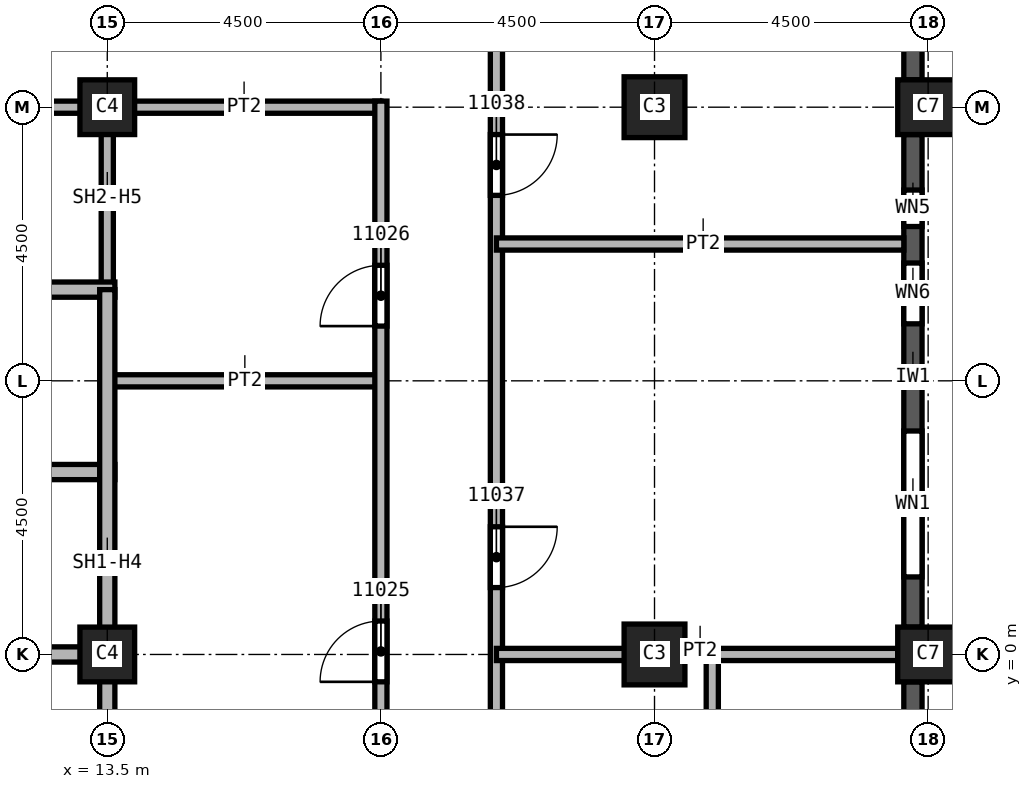
"""IFC4 building model, lengths in metres.
Left out: names, types, materials, properties, quantities, classifications, styles, units other than length and angle.
Written with IfcOpenShell. Run it as: python <this file> out.ifc"""

import sys

from ifc_helpers import new_model, si_unit, direction, frame, frame_2d, origin, origin_2d, place, context, subcontext, project, spatial, rectangle, extrude, element, fill, save


model = new_model("IFC4")
c1 = context("Model", 3, precision=1e-05, world=origin(), true_north=direction((0.0, 1.0)))
c2 = subcontext(c1, "Body", "Model", "MODEL_VIEW")
j1 = project(units=[si_unit("LENGTHUNIT", "METRE"), si_unit("PLANEANGLEUNIT", "RADIAN")], contexts=[c1])
p1 = place(None, origin())
s1 = spatial("IfcSite", under=j1, at=p1, CompositionType="ELEMENT")
p2 = place(p1, origin())
s2 = spatial("IfcBuilding", under=s1, at=p2, CompositionType="ELEMENT")
p3 = place(p2, frame((0.0, 0.0, 188.0)))
s3 = spatial("IfcBuildingStorey", under=s2, at=p3, CompositionType="ELEMENT", Elevation=188.0)
for number, where, z_axis, x_axis in (
    (1, (22.5, 0.0, 0.0), (0.0, 0.0, 1.0), (1.0, 0.0, 0.0)),
    (2, (22.5, 9.0, 0.0), (0.0, 0.0, 1.0), (1.0, 0.0, 0.0)),
):
    element("IfcColumn", number, at=place(p3, frame(where, z_axis=z_axis, x_axis=x_axis)), inside=s3, PredefinedType="COLUMN", context=c2, shape_type="SweptSolid", body=[
        extrude(rectangle(XDim=1.0, YDim=1.0, at=origin_2d()), origin(), (0.0, 0.0, 1.0), 3.72),
    ])
for number, where, z_axis, x_axis in (
    (3, (13.5, 0.0, 0.0), (0.0, 0.0, 1.0), (1.0, 0.0, 0.0)),
    (4, (13.5, 9.0, 0.0), (0.0, 0.0, 1.0), (1.0, 0.0, 0.0)),
):
    element("IfcColumn", number, at=place(p3, frame(where, z_axis=z_axis, x_axis=x_axis)), inside=s3, PredefinedType="COLUMN", context=c2, shape_type="SweptSolid", body=[
        extrude(rectangle(XDim=0.9, YDim=0.9, at=origin_2d()), origin(), (0.0, 0.0, 1.0), 3.72),
    ])
for number, where, z_axis, x_axis in (
    (5, (27.0, 0.0, 0.0), (0.0, 0.0, 1.0), (0.0, 1.0, 0.0)),
    (6, (27.0, 9.0, 0.0), (0.0, 0.0, 1.0), (0.0, 1.0, 0.0)),
):
    element("IfcColumn", number, at=place(p3, frame(where, z_axis=z_axis, x_axis=x_axis)), inside=s3, PredefinedType="COLUMN", context=c2, shape_type="SweptSolid", body=[
        extrude(rectangle(XDim=0.9, YDim=1.0, at=origin_2d()), origin(), (0.0, 0.0, 1.0), 3.72),
    ])
p4 = place(p3, frame((26.75, -8.55, 0.0), z_axis=(0.0, 0.0, 1.0), x_axis=(0.0, 1.0, 0.0)))
e7 = element("IfcWall", 7, at=p4, inside=s3, PredefinedType="SOLIDWALL", context=c2, shape_type="SweptSolid", body=[
    extrude(rectangle(XDim=8.1, YDim=0.3, at=frame_2d((4.05, 0.0))), origin(), (0.0, 0.0, 1.0), 3.12),
])
p5 = place(p4, frame((0.825, 0.0, 0.8)))
e8 = element("IfcOpeningElement", 8, at=p5, cuts=e7, PredefinedType="OPENING", context=c2, shape_type="SweptSolid", body=[
    extrude(rectangle(XDim=2.4, YDim=1.95, at=frame_2d((1.2, 0.975))), frame((0.0, 0.15, 0.0), z_axis=(0.0, -1.0, 0.0), x_axis=(1.0, 0.0, 0.0)), (0.0, 0.0, 1.0), 0.3),
])
p6 = place(p4, frame((4.875, 0.0, 0.8)))
e9 = element("IfcOpeningElement", 9, at=p6, cuts=e7, PredefinedType="OPENING", context=c2, shape_type="SweptSolid", body=[
    extrude(rectangle(XDim=2.4, YDim=1.95, at=frame_2d((1.2, 0.975))), frame((0.0, 0.15, 0.0), z_axis=(0.0, -1.0, 0.0), x_axis=(1.0, 0.0, 0.0)), (0.0, 0.0, 1.0), 0.3),
])
p7 = place(p3, frame((26.75, 0.45, 0.0), z_axis=(0.0, 0.0, 1.0), x_axis=(0.0, 1.0, 0.0)))
e10 = element("IfcWall", 10, at=p7, inside=s3, PredefinedType="SOLIDWALL", context=c2, shape_type="SweptSolid", body=[
    extrude(rectangle(XDim=8.1, YDim=0.3, at=frame_2d((4.05, 0.0))), origin(), (0.0, 0.0, 1.0), 3.12),
])
p8 = place(p7, frame((0.825, 0.0, 0.8)))
e11 = element("IfcOpeningElement", 11, at=p8, cuts=e10, PredefinedType="OPENING", context=c2, shape_type="SweptSolid", body=[
    extrude(rectangle(XDim=2.4, YDim=1.95, at=frame_2d((1.2, 0.975))), frame((0.0, 0.15, 0.0), z_axis=(0.0, -1.0, 0.0), x_axis=(1.0, 0.0, 0.0)), (0.0, 0.0, 1.0), 0.3),
])
p9 = place(p7, frame((4.988, 0.0, 0.8)))
e12 = element("IfcOpeningElement", 12, at=p9, cuts=e10, PredefinedType="OPENING", context=c2, shape_type="SweptSolid", body=[
    extrude(rectangle(XDim=1.0, YDim=1.95, at=frame_2d((0.5, 0.975))), frame((0.0, 0.15, 0.0), z_axis=(0.0, -1.0, 0.0), x_axis=(1.0, 0.0, 0.0)), (0.0, 0.0, 1.0), 0.3),
])
p10 = place(p7, frame((6.587, 0.0, 0.8)))
e13 = element("IfcOpeningElement", 13, at=p10, cuts=e10, PredefinedType="OPENING", context=c2, shape_type="SweptSolid", body=[
    extrude(rectangle(XDim=0.6, YDim=1.95, at=frame_2d((0.3, 0.975))), frame((0.0, 0.15, 0.0), z_axis=(0.0, -1.0, 0.0), x_axis=(1.0, 0.0, 0.0)), (0.0, 0.0, 1.0), 0.3),
])
p11 = place(p3, frame((26.75, 9.45, 0.0), z_axis=(0.0, 0.0, 1.0), x_axis=(0.0, 1.0, 0.0)))
e14 = element("IfcWall", 14, at=p11, inside=s3, PredefinedType="SOLIDWALL", context=c2, shape_type="SweptSolid", body=[
    extrude(rectangle(XDim=8.1, YDim=0.3, at=frame_2d((4.05, 0.0))), origin(), (0.0, 0.0, 1.0), 3.12),
])
p12 = place(p11, frame((4.875, 0.0, 0.8)))
e15 = element("IfcOpeningElement", 15, at=p12, cuts=e14, PredefinedType="OPENING", context=c2, shape_type="SweptSolid", body=[
    extrude(rectangle(XDim=2.4, YDim=1.95, at=frame_2d((1.2, 0.975))), frame((0.0, 0.15, 0.0), z_axis=(0.0, -1.0, 0.0), x_axis=(1.0, 0.0, 0.0)), (0.0, 0.0, 1.0), 0.3),
])
p13 = place(p11, frame((0.913, 0.0, 0.8)))
e16 = element("IfcOpeningElement", 16, at=p13, cuts=e14, PredefinedType="OPENING", context=c2, shape_type="SweptSolid", body=[
    extrude(rectangle(XDim=0.6, YDim=1.95, at=frame_2d((0.3, 0.975))), frame((0.0, 0.15, 0.0), z_axis=(0.0, -1.0, 0.0), x_axis=(1.0, 0.0, 0.0)), (0.0, 0.0, 1.0), 0.3),
])
p14 = place(p11, frame((2.113, 0.0, 0.8)))
e17 = element("IfcOpeningElement", 17, at=p14, cuts=e14, PredefinedType="OPENING", context=c2, shape_type="SweptSolid", body=[
    extrude(rectangle(XDim=1.0, YDim=1.95, at=frame_2d((0.5, 0.975))), frame((0.0, 0.15, 0.0), z_axis=(0.0, -1.0, 0.0), x_axis=(1.0, 0.0, 0.0)), (0.0, 0.0, 1.0), 0.3),
])
for number, where, z_axis, x_axis in (
    (18, (13.5, 4.5, 0.0), (0.0, 0.0, 1.0), (1.0, 0.0, 0.0)),
    (19, (18.0, 9.0, 0.0), (0.0, 0.0, 1.0), (-1.0, 0.0, 0.0)),
):
    element("IfcWall", number, at=place(p3, frame(where, z_axis=z_axis, x_axis=x_axis)), inside=s3, PredefinedType="PARTITIONING", context=c2, shape_type="SweptSolid", body=[
        extrude(rectangle(XDim=4.5, YDim=0.2, at=frame_2d((2.25, 0.0))), origin(), (0.0, 0.0, 1.0), 3.72),
    ])
p15 = place(p3, frame((18.0, -9.1, 0.0), z_axis=(0.0, 0.0, 1.0), x_axis=(0.0, 1.0, 0.0)))
e20 = element("IfcWall", 20, at=p15, inside=s3, PredefinedType="PARTITIONING", context=c2, shape_type="SweptSolid", body=[
    extrude(rectangle(XDim=18.2, YDim=0.2, at=frame_2d((9.1, 0.0))), origin(), (0.0, 0.0, 1.0), 3.72),
])
p16 = place(p15, frame((2.8, 0.0, 0.0)))
e21 = element("IfcOpeningElement", 21, at=p16, cuts=e20, PredefinedType="OPENING", context=c2, shape_type="SweptSolid", body=[
    extrude(rectangle(XDim=1.0, YDim=2.1, at=frame_2d((0.5, 1.05))), frame((0.0, 0.1, 0.0), z_axis=(0.0, -1.0, 0.0), x_axis=(1.0, 0.0, 0.0)), (0.0, 0.0, 1.0), 0.2),
])
p17 = place(p15, frame((8.65, 0.0, 0.0)))
e22 = element("IfcOpeningElement", 22, at=p17, cuts=e20, PredefinedType="OPENING", context=c2, shape_type="SweptSolid", body=[
    extrude(rectangle(XDim=1.0, YDim=2.1, at=frame_2d((0.5, 1.05))), frame((0.0, 0.1, 0.0), z_axis=(0.0, -1.0, 0.0), x_axis=(1.0, 0.0, 0.0)), (0.0, 0.0, 1.0), 0.2),
])
p18 = place(p15, frame((14.5, 0.0, 0.0)))
e23 = element("IfcOpeningElement", 23, at=p18, cuts=e20, PredefinedType="OPENING", context=c2, shape_type="SweptSolid", body=[
    extrude(rectangle(XDim=1.0, YDim=2.1, at=frame_2d((0.5, 1.05))), frame((0.0, 0.1, 0.0), z_axis=(0.0, -1.0, 0.0), x_axis=(1.0, 0.0, 0.0)), (0.0, 0.0, 1.0), 0.2),
])
p19 = place(p3, frame((19.9, 22.4, 0.0), z_axis=(0.0, 0.0, 1.0), x_axis=(0.0, -1.0, 0.0)))
e24 = element("IfcWall", 24, at=p19, inside=s3, PredefinedType="PARTITIONING", context=c2, shape_type="SweptSolid", body=[
    extrude(rectangle(XDim=44.8, YDim=0.2, at=frame_2d((22.4, 0.0))), origin(), (0.0, 0.0, 1.0), 3.72),
])
p20 = place(p19, frame((20.3, 0.0, 0.0)))
e25 = element("IfcOpeningElement", 25, at=p20, cuts=e24, PredefinedType="OPENING", context=c2, shape_type="SweptSolid", body=[
    extrude(rectangle(XDim=1.0, YDim=2.1, at=frame_2d((0.5, 1.05))), frame((0.0, 0.1, 0.0), z_axis=(0.0, -1.0, 0.0), x_axis=(1.0, 0.0, 0.0)), (0.0, 0.0, 1.0), 0.2),
])
p21 = place(p19, frame((13.85, 0.0, 0.0)))
e26 = element("IfcOpeningElement", 26, at=p21, cuts=e24, PredefinedType="OPENING", context=c2, shape_type="SweptSolid", body=[
    extrude(rectangle(XDim=1.0, YDim=2.1, at=frame_2d((0.5, 1.05))), frame((0.0, 0.1, 0.0), z_axis=(0.0, -1.0, 0.0), x_axis=(1.0, 0.0, 0.0)), (0.0, 0.0, 1.0), 0.2),
])
p22 = place(p19, frame((5.2, 0.0, 0.0)))
e27 = element("IfcOpeningElement", 27, at=p22, cuts=e24, PredefinedType="OPENING", context=c2, shape_type="SweptSolid", body=[
    extrude(rectangle(XDim=1.0, YDim=2.1, at=frame_2d((0.5, 1.05))), frame((0.0, 0.1, 0.0), z_axis=(0.0, -1.0, 0.0), x_axis=(1.0, 0.0, 0.0)), (0.0, 0.0, 1.0), 0.2),
])
p23 = place(p19, frame((40.05, 0.0, 0.0)))
e28 = element("IfcOpeningElement", 28, at=p23, cuts=e24, PredefinedType="OPENING", context=c2, shape_type="SweptSolid", body=[
    extrude(rectangle(XDim=1.0, YDim=2.1, at=frame_2d((0.5, 1.05))), frame((0.0, 0.1, 0.0), z_axis=(0.0, -1.0, 0.0), x_axis=(1.0, 0.0, 0.0)), (0.0, 0.0, 1.0), 0.2),
])
p24 = place(p19, frame((26.9, 0.0, 0.0)))
e29 = element("IfcOpeningElement", 29, at=p24, cuts=e24, PredefinedType="OPENING", context=c2, shape_type="SweptSolid", body=[
    extrude(rectangle(XDim=1.0, YDim=2.1, at=frame_2d((0.5, 1.05))), frame((0.0, 0.1, 0.0), z_axis=(0.0, -1.0, 0.0), x_axis=(1.0, 0.0, 0.0)), (0.0, 0.0, 1.0), 0.2),
])
p25 = place(p3, frame((19.9, 6.75, 0.0), z_axis=(0.0, 0.0, 1.0), x_axis=(1.0, 0.0, 0.0)))
e30 = element("IfcWall", 30, at=p25, inside=s3, PredefinedType="PARTITIONING", context=c2, shape_type="SweptSolid", body=[
    extrude(rectangle(XDim=6.7, YDim=0.2, at=frame_2d((3.35, 0.0))), origin(), (0.0, 0.0, 1.0), 3.72),
])
p26 = place(p3, frame((23.45, 0.0, 0.0), z_axis=(0.0, 0.0, 1.0), x_axis=(0.0, -1.0, 0.0)))
e31 = element("IfcWall", 31, at=p26, inside=s3, PredefinedType="PARTITIONING", context=c2, shape_type="SweptSolid", body=[
    extrude(rectangle(XDim=13.5, YDim=0.2, at=frame_2d((6.75, 0.0))), origin(), (0.0, 0.0, 1.0), 3.72),
])
p27 = place(p26, frame((3.55, 0.0, 0.0)))
e32 = element("IfcOpeningElement", 32, at=p27, cuts=e31, PredefinedType="OPENING", context=c2, shape_type="SweptSolid", body=[
    extrude(rectangle(XDim=1.0, YDim=2.1, at=frame_2d((0.5, 1.05))), frame((0.0, 0.1, 0.0), z_axis=(0.0, -1.0, 0.0), x_axis=(1.0, 0.0, 0.0)), (0.0, 0.0, 1.0), 0.2),
])
p28 = place(p3, frame((26.5, 0.0, 0.0), z_axis=(0.0, 0.0, 1.0), x_axis=(-1.0, 0.0, 0.0)))
e33 = element("IfcWall", 33, at=p28, inside=s3, PredefinedType="PARTITIONING", context=c2, shape_type="SweptSolid", body=[
    extrude(rectangle(XDim=6.6, YDim=0.2, at=frame_2d((3.3, 0.0))), origin(), (0.0, 0.0, 1.0), 3.72),
])
for number, where, z_axis, x_axis in (
    (34, (10.5, 9.0, 0.0), (0.0, 0.0, 1.0), (1.0, 0.0, 0.0)),
    (35, (13.5, 9.1, 0.0), (0.0, 0.0, 1.0), (0.0, -1.0, 0.0)),
):
    element("IfcWall", number, at=place(p3, frame(where, z_axis=z_axis, x_axis=x_axis)), inside=s3, PredefinedType="SOLIDWALL", context=c2, shape_type="SweptSolid", body=[
        extrude(rectangle(XDim=3.1, YDim=0.2, at=frame_2d((1.55, 0.0))), origin(), (0.0, 0.0, 1.0), 2.958),
    ])
p29 = place(p3, frame((7.5, 3.0, 0.0), z_axis=(0.0, 0.0, 1.0), x_axis=(1.0, 0.0, 0.0)))
e36 = element("IfcWall", 36, at=p29, inside=s3, PredefinedType="SOLIDWALL", context=c2, shape_type="SweptSolid", body=[
    extrude(rectangle(XDim=6.125, YDim=0.25, at=frame_2d((3.062, 0.0))), origin(), (0.0, 0.0, 1.0), 3.72),
])
p30 = place(p29, frame((1.0, 0.0, 0.0)))
e37 = element("IfcOpeningElement", 37, at=p30, cuts=e36, PredefinedType="OPENING", context=c2, shape_type="SweptSolid", body=[
    extrude(rectangle(XDim=1.1, YDim=2.1, at=frame_2d((0.55, 1.05))), frame((0.0, 0.125, 0.0), z_axis=(0.0, -1.0, 0.0), x_axis=(1.0, 0.0, 0.0)), (0.0, 0.0, 1.0), 0.25),
])
for number, where, z_axis, x_axis in (
    (38, (10.5, 0.0, 0.0), (0.0, 0.0, 1.0), (1.0, 0.0, 0.0)),
    (39, (10.5, 6.0, 0.0), (0.0, 0.0, 1.0), (1.0, 0.0, 0.0)),
):
    element("IfcWall", number, at=place(p3, frame(where, z_axis=z_axis, x_axis=x_axis)), inside=s3, PredefinedType="SOLIDWALL", context=c2, shape_type="SweptSolid", body=[
        extrude(rectangle(XDim=3.125, YDim=0.25, at=frame_2d((1.562, 0.0))), origin(), (0.0, 0.0, 1.0), 3.72),
    ])
p31 = place(p3, frame((13.5, 6.0, 0.0), z_axis=(0.0, 0.0, 1.0), x_axis=(0.0, -1.0, 0.0)))
e40 = element("IfcWall", 40, at=p31, inside=s3, PredefinedType="SOLIDWALL", context=c2, shape_type="SweptSolid", body=[
    extrude(rectangle(XDim=9.0, YDim=0.25, at=frame_2d((4.5, 0.0))), origin(), (0.0, 0.0, 1.0), 2.958),
])
p32 = place(p8, origin())
e41 = element("IfcWindow", 41, at=p32, inside=s3, PartitioningType="SINGLE_PANEL", PredefinedType="WINDOW", context=c2, shape_type="SweptSolid", body=[
    extrude(rectangle(XDim=2.4, YDim=1.95, at=frame_2d((1.2, 0.975))), frame((0.0, 0.03, 0.0), z_axis=(0.0, -1.0, 0.0), x_axis=(1.0, 0.0, 0.0)), (0.0, 0.0, 1.0), 0.06),
])
fill(e11, e41)
p33 = place(p17, origin())
e42 = element("IfcDoor", 42, at=p33, inside=s3, OperationType="SINGLE_SWING_RIGHT", PredefinedType="DOOR", context=c2, shape_type="SweptSolid", body=[
    extrude(rectangle(XDim=1.0, YDim=2.1, at=frame_2d((0.5, 1.05))), frame((0.0, 0.025, 0.0), z_axis=(0.0, -1.0, 0.0), x_axis=(1.0, 0.0, 0.0)), (0.0, 0.0, 1.0), 0.05),
])
fill(e22, e42)
p34 = place(p18, origin())
e43 = element("IfcDoor", 43, at=p34, inside=s3, OperationType="SINGLE_SWING_LEFT", PredefinedType="DOOR", context=c2, shape_type="SweptSolid", body=[
    extrude(rectangle(XDim=1.0, YDim=2.1, at=frame_2d((0.5, 1.05))), frame((0.0, 0.025, 0.0), z_axis=(0.0, -1.0, 0.0), x_axis=(1.0, 0.0, 0.0)), (0.0, 0.0, 1.0), 0.05),
])
fill(e23, e43)
p35 = place(p20, origin())
e44 = element("IfcDoor", 44, at=p35, inside=s3, OperationType="SINGLE_SWING_RIGHT", PredefinedType="DOOR", context=c2, shape_type="SweptSolid", body=[
    extrude(rectangle(XDim=1.0, YDim=2.1, at=frame_2d((0.5, 1.05))), frame((0.0, 0.025, 0.0), z_axis=(0.0, -1.0, 0.0), x_axis=(1.0, 0.0, 0.0)), (0.0, 0.0, 1.0), 0.05),
])
fill(e25, e44)
p36 = place(p21, origin())
e45 = element("IfcDoor", 45, at=p36, inside=s3, OperationType="SINGLE_SWING_LEFT", PredefinedType="DOOR", context=c2, shape_type="SweptSolid", body=[
    extrude(rectangle(XDim=1.0, YDim=2.1, at=frame_2d((0.5, 1.05))), frame((0.0, 0.025, 0.0), z_axis=(0.0, -1.0, 0.0), x_axis=(1.0, 0.0, 0.0)), (0.0, 0.0, 1.0), 0.05),
])
fill(e26, e45)
p37 = place(p9, origin())
e46 = element("IfcWindow", 46, at=p37, inside=s3, PartitioningType="SINGLE_PANEL", PredefinedType="WINDOW", context=c2, shape_type="SweptSolid", body=[
    extrude(rectangle(XDim=1.0, YDim=1.95, at=frame_2d((0.5, 0.975))), frame((0.0, 0.03, 0.0), z_axis=(0.0, -1.0, 0.0), x_axis=(1.0, 0.0, 0.0)), (0.0, 0.0, 1.0), 0.06),
])
fill(e12, e46)
p38 = place(p10, origin())
e47 = element("IfcWindow", 47, at=p38, inside=s3, PartitioningType="SINGLE_PANEL", PredefinedType="WINDOW", context=c2, shape_type="SweptSolid", body=[
    extrude(rectangle(XDim=0.6, YDim=1.95, at=frame_2d((0.3, 0.975))), frame((0.0, 0.03, 0.0), z_axis=(0.0, -1.0, 0.0), x_axis=(1.0, 0.0, 0.0)), (0.0, 0.0, 1.0), 0.06),
])
fill(e13, e47)
save(model, sys.argv[1])
